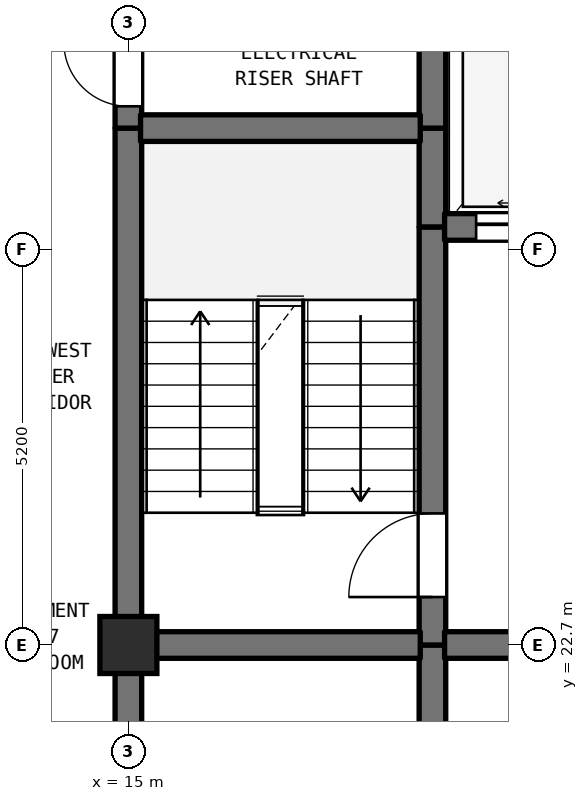
"""IFC4 building model, lengths in metres.
Left out: names, types, materials, properties, quantities, classifications, styles, units other than length and angle.
Written with IfcOpenShell. Run it as: python <this file> out.ifc"""

import sys

from ifc_helpers import new_model, si_unit, direction, frame, frame_2d, origin, origin_2d, place, context, subcontext, project, spatial, rectangle, extrude, element, fill, save


model = new_model("IFC4")
c1 = context("Model", 3, precision=1e-05, world=origin(), true_north=direction((0.0, 1.0)))
c2 = subcontext(c1, "Body", "Model", "MODEL_VIEW")
j1 = project(units=[si_unit("LENGTHUNIT", "METRE"), si_unit("PLANEANGLEUNIT", "RADIAN")], contexts=[c1])
p1 = place(None, origin())
s1 = spatial("IfcSite", under=j1, at=p1, CompositionType="ELEMENT")
p2 = place(p1, origin())
s2 = spatial("IfcBuilding", under=s1, at=p2, CompositionType="ELEMENT")
p3 = place(p2, frame((0.0, 0.0, 251.0)))
s3 = spatial("IfcBuildingStorey", under=s2, at=p3, CompositionType="ELEMENT", Elevation=251.0)
p4 = place(p3, frame((15.0, 22.7, 0.0), z_axis=(0.0, 0.0, 1.0), x_axis=(1.0, 0.0, 0.0)))
e1 = element("IfcColumn", 1, at=p4, inside=s3, PredefinedType="COLUMN", context=c2, shape_type="SweptSolid", body=[
    extrude(rectangle(XDim=0.75, YDim=0.75, at=origin_2d()), origin(), (0.0, 0.0, 1.0), 3.7),
])
p5 = place(p3, frame((15.0, 19.5, 0.0), z_axis=(0.0, 0.0, 1.0), x_axis=(0.0, 1.0, 0.0)))
e2 = element("IfcWall", 2, at=p5, inside=s3, PredefinedType="SHEAR", context=c2, shape_type="SweptSolid", body=[
    extrude(rectangle(XDim=3.2, YDim=0.35, at=frame_2d((1.6, 0.0))), origin(), (0.0, 0.0, 1.0), 3.39),
])
p6 = place(p3, frame((15.0, 22.7, 0.0), z_axis=(0.0, 0.0, 1.0), x_axis=(0.0, 1.0, 0.0)))
e3 = element("IfcWall", 3, at=p6, inside=s3, PredefinedType="SHEAR", context=c2, shape_type="SweptSolid", body=[
    extrude(rectangle(XDim=6.8, YDim=0.35, at=frame_2d((3.4, 0.0))), origin(), (0.0, 0.0, 1.0), 3.39),
])
p7 = place(p3, frame((15.0, 29.5, 0.0), z_axis=(0.0, 0.0, 1.0), x_axis=(0.0, 1.0, 0.0)))
e4 = element("IfcWall", 4, at=p7, inside=s3, PredefinedType="SHEAR", context=c2, shape_type="SweptSolid", body=[
    extrude(rectangle(XDim=1.6, YDim=0.35, at=frame_2d((0.8, 0.0))), origin(), (0.0, 0.0, 1.0), 3.39),
])
p8 = place(p7, frame((0.287, 0.0, 0.0)))
e5 = element("IfcOpeningElement", 5, at=p8, cuts=e4, PredefinedType="OPENING", context=c2, shape_type="SweptSolid", body=[
    extrude(rectangle(XDim=0.85, YDim=2.1, at=frame_2d((0.425, 1.05))), frame((0.0, 0.185, 0.0), z_axis=(0.0, -1.0, 0.0), x_axis=(1.0, 0.0, 0.0)), (0.0, 0.0, 1.0), 0.37),
])
p9 = place(p3, frame((19.0, 19.5, 0.0), z_axis=(0.0, 0.0, 1.0), x_axis=(0.0, 1.0, 0.0)))
e6 = element("IfcWall", 6, at=p9, inside=s3, PredefinedType="SHEAR", context=c2, shape_type="SweptSolid", body=[
    extrude(rectangle(XDim=3.2, YDim=0.35, at=frame_2d((1.6, 0.0))), origin(), (0.0, 0.0, 1.0), 3.39),
])
p10 = place(p3, frame((19.0, 22.7, 0.0), z_axis=(0.0, 0.0, 1.0), x_axis=(0.0, 1.0, 0.0)))
e7 = element("IfcWall", 7, at=p10, inside=s3, PredefinedType="SHEAR", context=c2, shape_type="SweptSolid", body=[
    extrude(rectangle(XDim=5.5, YDim=0.35, at=frame_2d((2.75, 0.0))), origin(), (0.0, 0.0, 1.0), 3.39),
])
p11 = place(p10, frame((0.631, 0.0, 0.0)))
e8 = element("IfcOpeningElement", 8, at=p11, cuts=e7, PredefinedType="OPENING", context=c2, shape_type="SweptSolid", body=[
    extrude(rectangle(XDim=1.1, YDim=2.15, at=frame_2d((0.55, 1.075))), frame((0.0, 0.185, 0.0), z_axis=(0.0, -1.0, 0.0), x_axis=(1.0, 0.0, 0.0)), (0.0, 0.0, 1.0), 0.37),
])
p12 = place(p3, frame((19.0, 28.2, 0.0), z_axis=(0.0, 0.0, 1.0), x_axis=(0.0, 1.0, 0.0)))
e9 = element("IfcWall", 9, at=p12, inside=s3, PredefinedType="SHEAR", context=c2, shape_type="SweptSolid", body=[
    extrude(rectangle(XDim=1.3, YDim=0.35, at=frame_2d((0.65, 0.0))), origin(), (0.0, 0.0, 1.0), 3.39),
])
p13 = place(p3, frame((19.0, 29.5, 0.0), z_axis=(0.0, 0.0, 1.0), x_axis=(0.0, 1.0, 0.0)))
e10 = element("IfcWall", 10, at=p13, inside=s3, PredefinedType="SHEAR", context=c2, shape_type="SweptSolid", body=[
    extrude(rectangle(XDim=5.5, YDim=0.35, at=frame_2d((2.75, 0.0))), origin(), (0.0, 0.0, 1.0), 3.39),
])
p14 = place(p13, frame((2.025, 0.0, 0.0)))
e11 = element("IfcOpeningElement", 11, at=p14, cuts=e10, PredefinedType="OPENING", context=c2, shape_type="SweptSolid", body=[
    extrude(rectangle(XDim=1.1, YDim=2.15, at=frame_2d((0.55, 1.075))), frame((0.0, 0.185, 0.0), z_axis=(0.0, -1.0, 0.0), x_axis=(1.0, 0.0, 0.0)), (0.0, 0.0, 1.0), 0.37),
])
p15 = place(p3, frame((15.16, 22.7, 0.0), z_axis=(0.0, 0.0, 1.0), x_axis=(1.0, 0.0, 0.0)))
e12 = element("IfcWall", 12, at=p15, inside=s3, PredefinedType="SHEAR", context=c2, shape_type="SweptSolid", body=[
    extrude(rectangle(XDim=3.68, YDim=0.35, at=frame_2d((1.84, 0.0))), origin(), (0.0, 0.0, 1.0), 3.39),
])
p16 = place(p3, frame((19.16, 22.7, 0.0), z_axis=(0.0, 0.0, 1.0), x_axis=(1.0, 0.0, 0.0)))
e13 = element("IfcWall", 13, at=p16, inside=s3, PredefinedType="SHEAR", context=c2, shape_type="SweptSolid", body=[
    extrude(rectangle(XDim=4.48, YDim=0.35, at=frame_2d((2.24, 0.0))), origin(), (0.0, 0.0, 1.0), 3.39),
])
p17 = place(p16, frame((1.64, 0.0, 0.0)))
e14 = element("IfcOpeningElement", 14, at=p17, cuts=e13, PredefinedType="OPENING", context=c2, shape_type="SweptSolid", body=[
    extrude(rectangle(XDim=1.2, YDim=2.2, at=frame_2d((0.6, 1.1))), frame((0.0, 0.185, 0.0), z_axis=(0.0, -1.0, 0.0), x_axis=(1.0, 0.0, 0.0)), (0.0, 0.0, 1.0), 0.37),
])
p18 = place(p3, frame((19.16, 28.2, 0.0), z_axis=(0.0, 0.0, 1.0), x_axis=(1.0, 0.0, 0.0)))
e15 = element("IfcWall", 15, at=p18, inside=s3, PredefinedType="SHEAR", context=c2, shape_type="SweptSolid", body=[
    extrude(rectangle(XDim=4.48, YDim=0.35, at=frame_2d((2.24, 0.0))), origin(), (0.0, 0.0, 1.0), 3.39),
])
p19 = place(p18, frame((0.415, 0.0, 0.0)))
e16 = element("IfcOpeningElement", 16, at=p19, cuts=e15, PredefinedType="OPENING", context=c2, shape_type="SweptSolid", body=[
    extrude(rectangle(XDim=1.25, YDim=2.2, at=frame_2d((0.625, 1.1))), frame((0.0, 0.185, 0.0), z_axis=(0.0, -1.0, 0.0), x_axis=(1.0, 0.0, 0.0)), (0.0, 0.0, 1.0), 0.37),
])
p20 = place(p18, frame((2.815, 0.0, 0.0)))
e17 = element("IfcOpeningElement", 17, at=p20, cuts=e15, PredefinedType="OPENING", context=c2, shape_type="SweptSolid", body=[
    extrude(rectangle(XDim=1.25, YDim=2.2, at=frame_2d((0.625, 1.1))), frame((0.0, 0.185, 0.0), z_axis=(0.0, -1.0, 0.0), x_axis=(1.0, 0.0, 0.0)), (0.0, 0.0, 1.0), 0.37),
])
p21 = place(p3, frame((15.16, 29.5, 0.0), z_axis=(0.0, 0.0, 1.0), x_axis=(1.0, 0.0, 0.0)))
e18 = element("IfcWall", 18, at=p21, inside=s3, PredefinedType="SHEAR", context=c2, shape_type="SweptSolid", body=[
    extrude(rectangle(XDim=3.68, YDim=0.35, at=frame_2d((1.84, 0.0))), origin(), (0.0, 0.0, 1.0), 3.39),
])
p22 = place(p8, origin())
e19 = element("IfcDoor", 19, at=p22, inside=s3, OperationType="SINGLE_SWING_RIGHT", PredefinedType="DOOR", context=c2, shape_type="SweptSolid", body=[
    extrude(rectangle(XDim=0.85, YDim=2.1, at=frame_2d((0.425, 1.05))), frame((0.0, 0.025, 0.0), z_axis=(0.0, -1.0, 0.0), x_axis=(1.0, 0.0, 0.0)), (0.0, 0.0, 1.0), 0.05),
])
fill(e5, e19)
p23 = place(p11, origin())
e20 = element("IfcDoor", 20, at=p23, inside=s3, OperationType="SINGLE_SWING_LEFT", PredefinedType="DOOR", context=c2, shape_type="SweptSolid", body=[
    extrude(rectangle(XDim=1.1, YDim=2.15, at=frame_2d((0.55, 1.075))), frame((0.0, 0.025, 0.0), z_axis=(0.0, -1.0, 0.0), x_axis=(1.0, 0.0, 0.0)), (0.0, 0.0, 1.0), 0.05),
])
fill(e8, e20)
p24 = place(p19, origin())
e21 = element("IfcDoor", 21, at=p24, inside=s3, OperationType="DOUBLE_DOOR_SLIDING", PredefinedType="DOOR", context=c2, shape_type="SweptSolid", body=[
    extrude(rectangle(XDim=1.25, YDim=2.2, at=frame_2d((0.625, 1.1))), frame((0.0, 0.025, 0.0), z_axis=(0.0, -1.0, 0.0), x_axis=(1.0, 0.0, 0.0)), (0.0, 0.0, 1.0), 0.05),
])
fill(e16, e21)
save(model, sys.argv[1])
